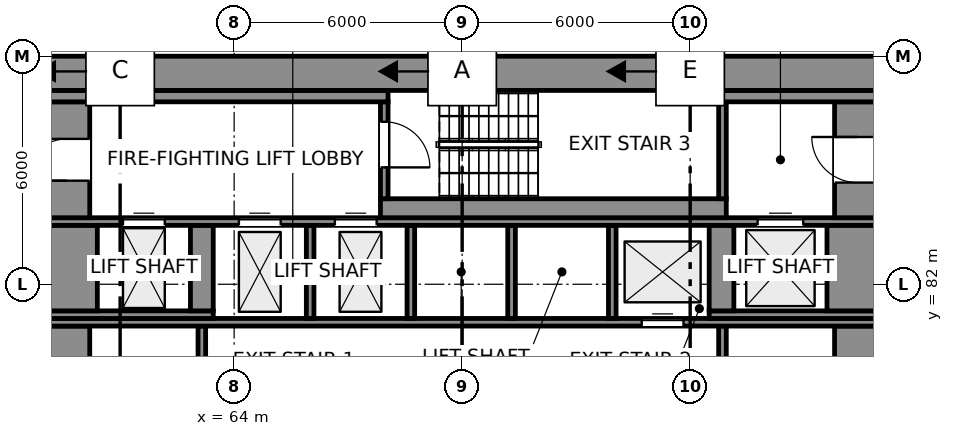
"""IFC4 building model, lengths in metres.
Left out: names, types, materials, properties, quantities, classifications, styles, units other than length and angle.
Written with IfcOpenShell. Run it as: python <this file> out.ifc"""

import sys

from ifc_helpers import new_model, si_unit, direction, frame, frame_2d, origin, place, context, subcontext, project, spatial, rectangle, extrude, element, fill, save


model = new_model("IFC4")
c1 = context("Model", 3, precision=1e-05, world=origin(), true_north=direction((0.0, 1.0)))
c2 = subcontext(c1, "Body", "Model", "MODEL_VIEW")
j1 = project(units=[si_unit("LENGTHUNIT", "METRE"), si_unit("PLANEANGLEUNIT", "RADIAN")], contexts=[c1])
p1 = place(None, origin())
s1 = spatial("IfcSite", under=j1, at=p1, CompositionType="ELEMENT")
p2 = place(p1, origin())
s2 = spatial("IfcBuilding", under=s1, at=p2, CompositionType="ELEMENT")
p3 = place(p2, frame((0.0, 0.0, 39.0)))
s3 = spatial("IfcBuildingStorey", under=s2, at=p3, CompositionType="ELEMENT", Elevation=39.0)
for number, where, z_axis, x_axis in (
    (1, (59.6, 72.2, 0.0), (0.0, 0.0, 1.0), (0.0, 1.0, 0.0)),
    (2, (80.4, 72.2, 0.0), (0.0, 0.0, 1.0), (0.0, 1.0, 0.0)),
):
    element("IfcWall", number, at=place(p3, frame(where, z_axis=z_axis, x_axis=x_axis)), inside=s3, PredefinedType="SHEAR", context=c2, shape_type="SweptSolid", body=[
        extrude(rectangle(XDim=8.7, YDim=1.2, at=frame_2d((4.35, 0.0))), origin(), (0.0, 0.0, 1.0), 3.9),
    ])
for number, where, z_axis, x_axis in (
    (3, (63.15, 77.7, 0.0), (0.0, 0.0, 1.0), (0.0, 1.0, 0.0)),
    (4, (76.85, 77.7, 0.0), (0.0, 0.0, 1.0), (0.0, 1.0, 0.0)),
):
    element("IfcWall", number, at=place(p3, frame(where, z_axis=z_axis, x_axis=x_axis)), inside=s3, PredefinedType="SHEAR", context=c2, shape_type="SweptSolid", body=[
        extrude(rectangle(XDim=3.2, YDim=0.2, at=frame_2d((1.6, 0.0))), origin(), (0.0, 0.0, 1.0), 3.9),
    ])
p4 = place(p3, frame((59.0, 81.0, 0.0), z_axis=(0.0, 0.0, 1.0), x_axis=(1.0, 0.0, 0.0)))
e5 = element("IfcWall", 5, at=p4, inside=s3, PredefinedType="SHEAR", context=c2, shape_type="SweptSolid", body=[
    extrude(rectangle(XDim=22.0, YDim=0.2, at=frame_2d((11.0, 0.0))), origin(), (0.0, 0.0, 1.0), 3.9),
])
p5 = place(p4, frame((15.725, 0.0, 0.0)))
e6 = element("IfcOpeningElement", 6, at=p5, cuts=e5, PredefinedType="OPENING", context=c2, shape_type="SweptSolid", body=[
    extrude(rectangle(XDim=1.1, YDim=2.1, at=frame_2d((0.55, 1.05))), frame((0.0, 0.11, 0.0), z_axis=(0.0, -1.0, 0.0), x_axis=(1.0, 0.0, 0.0)), (0.0, 0.0, 1.0), 0.22),
])
p6 = place(p3, frame((59.0, 81.2, 0.0), z_axis=(0.0, 0.0, 1.0), x_axis=(1.0, 0.0, 0.0)))
e7 = element("IfcWall", 7, at=p6, inside=s3, PredefinedType="SHEAR", context=c2, shape_type="SweptSolid", body=[
    extrude(rectangle(XDim=4.45, YDim=0.2, at=frame_2d((2.225, 0.0))), origin(), (0.0, 0.0, 1.0), 3.9),
])
for number, where, z_axis, x_axis in (
    (8, (66.0, 81.1, 0.0), (0.0, 0.0, 1.0), (0.0, 1.0, 0.0)),
    (9, (68.65, 81.1, 0.0), (0.0, 0.0, 1.0), (0.0, 1.0, 0.0)),
    (10, (71.3, 81.1, 0.0), (0.0, 0.0, 1.0), (0.0, 1.0, 0.0)),
    (11, (73.95, 81.1, 0.0), (0.0, 0.0, 1.0), (0.0, 1.0, 0.0)),
):
    element("IfcWall", number, at=place(p3, frame(where, z_axis=z_axis, x_axis=x_axis)), inside=s3, PredefinedType="SHEAR", context=c2, shape_type="SweptSolid", body=[
        extrude(rectangle(XDim=2.45, YDim=0.2, at=frame_2d((1.225, 0.0))), origin(), (0.0, 0.0, 1.0), 3.9),
    ])
p7 = place(p3, frame((76.5, 81.2, 0.0), z_axis=(0.0, 0.0, 1.0), x_axis=(1.0, 0.0, 0.0)))
e12 = element("IfcWall", 12, at=p7, inside=s3, PredefinedType="SHEAR", context=c2, shape_type="SweptSolid", body=[
    extrude(rectangle(XDim=4.5, YDim=0.2, at=frame_2d((2.25, 0.0))), origin(), (0.0, 0.0, 1.0), 3.9),
])
p8 = place(p3, frame((59.7, 81.3, 0.0), z_axis=(0.0, 0.0, 1.0), x_axis=(0.0, 1.0, 0.0)))
e13 = element("IfcWall", 13, at=p8, inside=s3, PredefinedType="SHEAR", context=c2, shape_type="SweptSolid", body=[
    extrude(rectangle(XDim=2.25, YDim=1.4, at=frame_2d((1.125, 0.0))), origin(), (0.0, 0.0, 1.0), 3.9),
])
p9 = place(p3, frame((63.15, 81.3, 0.0), z_axis=(0.0, 0.0, 1.0), x_axis=(0.0, 1.0, 0.0)))
e14 = element("IfcWall", 14, at=p9, inside=s3, PredefinedType="SHEAR", context=c2, shape_type="SweptSolid", body=[
    extrude(rectangle(XDim=2.25, YDim=0.6, at=frame_2d((1.125, 0.0))), origin(), (0.0, 0.0, 1.0), 3.9),
])
p10 = place(p3, frame((76.825, 81.3, 0.0), z_axis=(0.0, 0.0, 1.0), x_axis=(0.0, 1.0, 0.0)))
e15 = element("IfcWall", 15, at=p10, inside=s3, PredefinedType="SHEAR", context=c2, shape_type="SweptSolid", body=[
    extrude(rectangle(XDim=2.25, YDim=0.65, at=frame_2d((1.125, 0.0))), origin(), (0.0, 0.0, 1.0), 3.9),
])
p11 = place(p3, frame((80.3, 81.3, 0.0), z_axis=(0.0, 0.0, 1.0), x_axis=(0.0, 1.0, 0.0)))
e16 = element("IfcWall", 16, at=p11, inside=s3, PredefinedType="SHEAR", context=c2, shape_type="SweptSolid", body=[
    extrude(rectangle(XDim=2.25, YDim=1.4, at=frame_2d((1.125, 0.0))), origin(), (0.0, 0.0, 1.0), 3.9),
])
p12 = place(p3, frame((59.0, 83.65, 0.0), z_axis=(0.0, 0.0, 1.0), x_axis=(1.0, 0.0, 0.0)))
e17 = element("IfcWall", 17, at=p12, inside=s3, PredefinedType="SHEAR", context=c2, shape_type="SweptSolid", body=[
    extrude(rectangle(XDim=22.0, YDim=0.2, at=frame_2d((11.0, 0.0))), origin(), (0.0, 0.0, 1.0), 3.9),
])
p13 = place(p12, frame((5.125, 0.0, 0.0)))
e18 = element("IfcOpeningElement", 18, at=p13, cuts=e17, PredefinedType="OPENING", context=c2, shape_type="SweptSolid", body=[
    extrude(rectangle(XDim=1.1, YDim=2.1, at=frame_2d((0.55, 1.05))), frame((0.0, 0.11, 0.0), z_axis=(0.0, -1.0, 0.0), x_axis=(1.0, 0.0, 0.0)), (0.0, 0.0, 1.0), 0.22),
])
p14 = place(p12, frame((7.65, 0.0, 0.0)))
e19 = element("IfcOpeningElement", 19, at=p14, cuts=e17, PredefinedType="OPENING", context=c2, shape_type="SweptSolid", body=[
    extrude(rectangle(XDim=1.1, YDim=2.1, at=frame_2d((0.55, 1.05))), frame((0.0, 0.11, 0.0), z_axis=(0.0, -1.0, 0.0), x_axis=(1.0, 0.0, 0.0)), (0.0, 0.0, 1.0), 0.22),
])
p15 = place(p12, frame((18.775, 0.0, 0.0)))
e20 = element("IfcOpeningElement", 20, at=p15, cuts=e17, PredefinedType="OPENING", context=c2, shape_type="SweptSolid", body=[
    extrude(rectangle(XDim=1.2, YDim=2.1, at=frame_2d((0.6, 1.05))), frame((0.0, 0.11, 0.0), z_axis=(0.0, -1.0, 0.0), x_axis=(1.0, 0.0, 0.0)), (0.0, 0.0, 1.0), 0.22),
])
p16 = place(p12, frame((2.075, 0.0, 0.0)))
e21 = element("IfcOpeningElement", 21, at=p16, cuts=e17, PredefinedType="OPENING", context=c2, shape_type="SweptSolid", body=[
    extrude(rectangle(XDim=1.1, YDim=2.1, at=frame_2d((0.55, 1.05))), frame((0.0, 0.11, 0.0), z_axis=(0.0, -1.0, 0.0), x_axis=(1.0, 0.0, 0.0)), (0.0, 0.0, 1.0), 0.22),
])
p17 = place(p3, frame((59.6, 83.75, 0.0), z_axis=(0.0, 0.0, 1.0), x_axis=(0.0, 1.0, 0.0)))
e22 = element("IfcWall", 22, at=p17, inside=s3, PredefinedType="SHEAR", context=c2, shape_type="SweptSolid", body=[
    extrude(rectangle(XDim=3.05, YDim=1.2, at=frame_2d((1.525, 0.0))), origin(), (0.0, 0.0, 1.0), 3.9),
])
p18 = place(p17, frame((0.975, 0.0, 0.0)))
e23 = element("IfcOpeningElement", 23, at=p18, cuts=e22, PredefinedType="OPENING", context=c2, shape_type="SweptSolid", body=[
    extrude(rectangle(XDim=1.1, YDim=2.1, at=frame_2d((0.55, 1.05))), frame((0.0, 0.61, 0.0), z_axis=(0.0, -1.0, 0.0), x_axis=(1.0, 0.0, 0.0)), (0.0, 0.0, 1.0), 1.22),
])
p19 = place(p3, frame((67.85, 84.0, 0.0), z_axis=(0.0, 0.0, 1.0), x_axis=(1.0, 0.0, 0.0)))
e24 = element("IfcWall", 24, at=p19, inside=s3, PredefinedType="SHEAR", context=c2, shape_type="SweptSolid", body=[
    extrude(rectangle(XDim=9.1, YDim=0.5, at=frame_2d((4.55, 0.0))), origin(), (0.0, 0.0, 1.0), 3.9),
])
p20 = place(p3, frame((80.4, 83.75, 0.0), z_axis=(0.0, 0.0, 1.0), x_axis=(0.0, 1.0, 0.0)))
e25 = element("IfcWall", 25, at=p20, inside=s3, PredefinedType="SHEAR", context=c2, shape_type="SweptSolid", body=[
    extrude(rectangle(XDim=3.05, YDim=1.2, at=frame_2d((1.525, 0.0))), origin(), (0.0, 0.0, 1.0), 3.9),
])
p21 = place(p20, frame((0.925, 0.0, 0.0)))
e26 = element("IfcOpeningElement", 26, at=p21, cuts=e25, PredefinedType="OPENING", context=c2, shape_type="SweptSolid", body=[
    extrude(rectangle(XDim=1.2, YDim=2.1, at=frame_2d((0.6, 1.05))), frame((0.0, 0.61, 0.0), z_axis=(0.0, -1.0, 0.0), x_axis=(1.0, 0.0, 0.0)), (0.0, 0.0, 1.0), 1.22),
])
p22 = place(p3, frame((67.95, 84.25, 0.0), z_axis=(0.0, 0.0, 1.0), x_axis=(0.0, 1.0, 0.0)))
e27 = element("IfcWall", 27, at=p22, inside=s3, PredefinedType="SHEAR", context=c2, shape_type="SweptSolid", body=[
    extrude(rectangle(XDim=2.55, YDim=0.2, at=frame_2d((1.275, 0.0))), origin(), (0.0, 0.0, 1.0), 3.9),
])
p23 = place(p22, frame((0.825, 0.0, 0.0)))
e28 = element("IfcOpeningElement", 28, at=p23, cuts=e27, PredefinedType="OPENING", context=c2, shape_type="SweptSolid", body=[
    extrude(rectangle(XDim=1.2, YDim=2.1, at=frame_2d((0.6, 1.05))), frame((0.0, 0.11, 0.0), z_axis=(0.0, -1.0, 0.0), x_axis=(1.0, 0.0, 0.0)), (0.0, 0.0, 1.0), 0.22),
])
p24 = place(p3, frame((76.85, 84.25, 0.0), z_axis=(0.0, 0.0, 1.0), x_axis=(0.0, 1.0, 0.0)))
e29 = element("IfcWall", 29, at=p24, inside=s3, PredefinedType="SHEAR", context=c2, shape_type="SweptSolid", body=[
    extrude(rectangle(XDim=2.55, YDim=0.2, at=frame_2d((1.275, 0.0))), origin(), (0.0, 0.0, 1.0), 3.9),
])
p25 = place(p3, frame((59.0, 86.95, 0.0), z_axis=(0.0, 0.0, 1.0), x_axis=(1.0, 0.0, 0.0)))
e30 = element("IfcWall", 30, at=p25, inside=s3, PredefinedType="SHEAR", context=c2, shape_type="SweptSolid", body=[
    extrude(rectangle(XDim=9.05, YDim=0.3, at=frame_2d((4.525, 0.0))), origin(), (0.0, 0.0, 1.0), 3.9),
])
p26 = place(p3, frame((76.75, 86.95, 0.0), z_axis=(0.0, 0.0, 1.0), x_axis=(1.0, 0.0, 0.0)))
e31 = element("IfcWall", 31, at=p26, inside=s3, PredefinedType="SHEAR", context=c2, shape_type="SweptSolid", body=[
    extrude(rectangle(XDim=4.25, YDim=0.3, at=frame_2d((2.125, 0.0))), origin(), (0.0, 0.0, 1.0), 3.9),
])
p27 = place(p3, frame((59.0, 87.55, 0.0), z_axis=(0.0, 0.0, 1.0), x_axis=(1.0, 0.0, 0.0)))
e32 = element("IfcWall", 32, at=p27, inside=s3, PredefinedType="SHEAR", context=c2, shape_type="SweptSolid", body=[
    extrude(rectangle(XDim=22.0, YDim=0.9, at=frame_2d((11.0, 0.0))), origin(), (0.0, 0.0, 1.0), 3.9),
])
p28 = place(p23, frame((1.2, 0.0, 0.0), z_axis=(0.0, 0.0, 1.0), x_axis=(-1.0, 0.0, 0.0)))
e33 = element("IfcDoor", 33, at=p28, inside=s3, OperationType="SINGLE_SWING_RIGHT", PredefinedType="DOOR", context=c2, shape_type="SweptSolid", body=[
    extrude(rectangle(XDim=1.2, YDim=2.1, at=frame_2d((0.6, 1.05))), frame((0.0, 0.025, 0.0), z_axis=(0.0, -1.0, 0.0), x_axis=(1.0, 0.0, 0.0)), (0.0, 0.0, 1.0), 0.05),
])
fill(e28, e33)
p29 = place(p18, origin())
e34 = element("IfcDoor", 34, at=p29, inside=s3, OperationType="SINGLE_SWING_LEFT", PredefinedType="DOOR", context=c2, shape_type="SweptSolid", body=[
    extrude(rectangle(XDim=1.1, YDim=2.1, at=frame_2d((0.55, 1.05))), frame((0.0, 0.025, 0.0), z_axis=(0.0, -1.0, 0.0), x_axis=(1.0, 0.0, 0.0)), (0.0, 0.0, 1.0), 0.05),
])
fill(e23, e34)
p30 = place(p21, origin())
e35 = element("IfcDoor", 35, at=p30, inside=s3, OperationType="SINGLE_SWING_RIGHT", PredefinedType="DOOR", context=c2, shape_type="SweptSolid", body=[
    extrude(rectangle(XDim=1.2, YDim=2.1, at=frame_2d((0.6, 1.05))), frame((0.0, 0.025, 0.0), z_axis=(0.0, -1.0, 0.0), x_axis=(1.0, 0.0, 0.0)), (0.0, 0.0, 1.0), 0.05),
])
fill(e26, e35)
p31 = place(p13, origin())
e36 = element("IfcDoor", 36, at=p31, inside=s3, OperationType="DOUBLE_DOOR_SLIDING", PredefinedType="DOOR", context=c2, shape_type="SweptSolid", body=[
    extrude(rectangle(XDim=1.1, YDim=2.1, at=frame_2d((0.55, 1.05))), frame((0.0, 0.025, 0.0), z_axis=(0.0, -1.0, 0.0), x_axis=(1.0, 0.0, 0.0)), (0.0, 0.0, 1.0), 0.05),
])
fill(e18, e36)
p32 = place(p14, origin())
e37 = element("IfcDoor", 37, at=p32, inside=s3, OperationType="DOUBLE_DOOR_SLIDING", PredefinedType="DOOR", context=c2, shape_type="SweptSolid", body=[
    extrude(rectangle(XDim=1.1, YDim=2.1, at=frame_2d((0.55, 1.05))), frame((0.0, 0.025, 0.0), z_axis=(0.0, -1.0, 0.0), x_axis=(1.0, 0.0, 0.0)), (0.0, 0.0, 1.0), 0.05),
])
fill(e19, e37)
p33 = place(p5, origin())
e38 = element("IfcDoor", 38, at=p33, inside=s3, OperationType="DOUBLE_DOOR_SLIDING", PredefinedType="DOOR", context=c2, shape_type="SweptSolid", body=[
    extrude(rectangle(XDim=1.1, YDim=2.1, at=frame_2d((0.55, 1.05))), frame((0.0, 0.025, 0.0), z_axis=(0.0, -1.0, 0.0), x_axis=(1.0, 0.0, 0.0)), (0.0, 0.0, 1.0), 0.05),
])
fill(e6, e38)
p34 = place(p15, origin())
e39 = element("IfcDoor", 39, at=p34, inside=s3, OperationType="DOUBLE_DOOR_SLIDING", PredefinedType="DOOR", context=c2, shape_type="SweptSolid", body=[
    extrude(rectangle(XDim=1.2, YDim=2.1, at=frame_2d((0.6, 1.05))), frame((0.0, 0.025, 0.0), z_axis=(0.0, -1.0, 0.0), x_axis=(1.0, 0.0, 0.0)), (0.0, 0.0, 1.0), 0.05),
])
fill(e20, e39)
p35 = place(p16, origin())
e40 = element("IfcDoor", 40, at=p35, inside=s3, OperationType="DOUBLE_DOOR_SLIDING", PredefinedType="DOOR", context=c2, shape_type="SweptSolid", body=[
    extrude(rectangle(XDim=1.1, YDim=2.1, at=frame_2d((0.55, 1.05))), frame((0.0, 0.025, 0.0), z_axis=(0.0, -1.0, 0.0), x_axis=(1.0, 0.0, 0.0)), (0.0, 0.0, 1.0), 0.05),
])
fill(e21, e40)
save(model, sys.argv[1])
